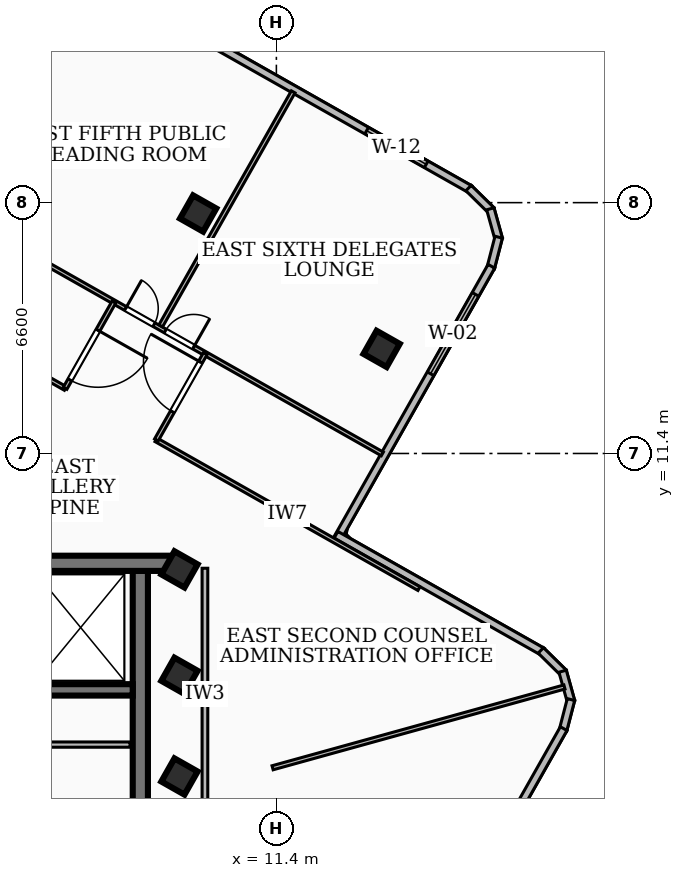
"""IFC4 building model, lengths in metres.
Left out: names, types, materials, properties, quantities, classifications, styles, units other than length and angle.
Written with IfcOpenShell. Run it as: python <this file> out.ifc"""

import sys

from ifc_helpers import new_model, si_unit, direction, frame, frame_2d, origin, origin_2d, place, context, subcontext, project, spatial, rectangle, extrude, element, fill, save


model = new_model("IFC4")
c1 = context("Model", 3, precision=1e-05, world=origin(), true_north=direction((0.0, 1.0)))
c2 = subcontext(c1, "Body", "Model", "MODEL_VIEW")
j1 = project(units=[si_unit("LENGTHUNIT", "METRE"), si_unit("PLANEANGLEUNIT", "RADIAN")], contexts=[c1])
p1 = place(None, origin())
s1 = spatial("IfcSite", under=j1, at=p1, CompositionType="ELEMENT")
p2 = place(p1, origin())
s2 = spatial("IfcBuilding", under=s1, at=p2, CompositionType="ELEMENT")
p3 = place(p2, frame((0.0, 0.0, 278.28)))
s3 = spatial("IfcBuildingStorey", under=s2, at=p3, CompositionType="ELEMENT", Elevation=278.28)
p4 = place(p3, frame((-8.78, 8.51, 0.0), z_axis=(0.0, 0.0, 1.0), x_axis=(1.0, 0.0, 0.0)))
e1 = element("IfcWall", 1, at=p4, inside=s3, PredefinedType="SHEAR", context=c2, shape_type="SweptSolid", body=[
    extrude(rectangle(XDim=17.56, YDim=0.4, at=frame_2d((8.78, 0.0))), origin(), (0.0, 0.0, 1.0), 3.16),
])
p5 = place(p3, frame((7.82, 8.31, 0.0), z_axis=(0.0, 0.0, 1.0), x_axis=(0.0, -1.0, 0.0)))
e2 = element("IfcWall", 2, at=p5, inside=s3, PredefinedType="SHEAR", context=c2, shape_type="SweptSolid", body=[
    extrude(rectangle(XDim=6.36, YDim=0.4, at=frame_2d((3.18, 0.0))), origin(), (0.0, 0.0, 1.0), 3.16),
])
p6 = place(p3, frame((7.62, 5.18, 0.0), z_axis=(0.0, 0.0, 1.0), x_axis=(-1.0, 0.0, 0.0)))
e3 = element("IfcWall", 3, at=p6, inside=s3, PredefinedType="SOLIDWALL", context=c2, shape_type="SweptSolid", body=[
    extrude(rectangle(XDim=15.24, YDim=0.3, at=frame_2d((7.62, 0.0))), origin(), (0.0, 0.0, 1.0), 3.16),
])
p7 = place(p6, frame((5.77, 0.0, 0.0)))
e4 = element("IfcOpeningElement", 4, at=p7, cuts=e3, PredefinedType="OPENING", context=c2, shape_type="SweptSolid", body=[
    extrude(rectangle(XDim=1.1, YDim=2.15, at=frame_2d((0.55, 1.075))), frame((0.0, 0.16, 0.0), z_axis=(0.0, -1.0, 0.0), x_axis=(1.0, 0.0, 0.0)), (0.0, 0.0, 1.0), 0.32),
])
p8 = place(p6, frame((2.97, 0.0, 0.0)))
e5 = element("IfcOpeningElement", 5, at=p8, cuts=e3, PredefinedType="OPENING", context=c2, shape_type="SweptSolid", body=[
    extrude(rectangle(XDim=1.1, YDim=2.15, at=frame_2d((0.55, 1.075))), frame((0.0, 0.16, 0.0), z_axis=(0.0, -1.0, 0.0), x_axis=(1.0, 0.0, 0.0)), (0.0, 0.0, 1.0), 0.32),
])
p9 = place(p6, frame((7.97, 0.0, 0.0)))
e6 = element("IfcOpeningElement", 6, at=p9, cuts=e3, PredefinedType="OPENING", context=c2, shape_type="SweptSolid", body=[
    extrude(rectangle(XDim=1.0, YDim=2.1, at=frame_2d((0.5, 1.05))), frame((0.0, 0.16, 0.0), z_axis=(0.0, -1.0, 0.0), x_axis=(1.0, 0.0, 0.0)), (0.0, 0.0, 1.0), 0.32),
])
for number, where, z_axis, x_axis in (
    (7, (8.85, 2.9, 0.0), (0.0, 0.0, 1.0), (0.493, 0.87, 0.0)),
    (8, (8.85, 5.55, 0.0), (0.0, 0.0, 1.0), (0.493, 0.87, 0.0)),
    (9, (8.85, 8.35, 0.0), (0.0, 0.0, 1.0), (0.493, 0.87, 0.0)),
    (10, (14.169, 14.152, 0.0), (0.0, 0.0, 1.0), (0.493, 0.87, 0.0)),
    (11, (9.341, 17.714, 0.0), (0.0, 0.0, 1.0), (0.493, 0.87, 0.0)),
):
    element("IfcColumn", number, at=place(p3, frame(where, z_axis=z_axis, x_axis=x_axis)), inside=s3, PredefinedType="COLUMN", context=c2, shape_type="SweptSolid", body=[
        extrude(rectangle(XDim=0.7, YDim=0.7, at=origin_2d()), origin(), (0.0, 0.0, 1.0), 3.42),
    ])
p10 = place(p3, frame((1.599, 15.609, 0.0), z_axis=(0.0, 0.0, 1.0), x_axis=(0.492609649108, 0.870250385582, 0.0)))
e12 = element("IfcWall", 12, at=p10, inside=s3, PredefinedType="SOLIDWALL", context=c2, shape_type="SweptSolid", body=[
    extrude(rectangle(XDim=8.241, YDim=0.2, at=frame_2d((4.121, 0.0))), origin(), (0.0, 0.0, 1.0), 3.16),
])
p11 = place(p10, frame((5.528, 0.0, 0.85)))
e13 = element("IfcOpeningElement", 13, at=p11, cuts=e12, PredefinedType="OPENING", context=c2, shape_type="SweptSolid", body=[
    extrude(rectangle(XDim=1.8, YDim=1.8, at=frame_2d((0.9, 0.9))), frame((0.0, 0.11, 0.0), z_axis=(0.0, -1.0, 0.0), x_axis=(1.0, 0.0, 0.0)), (0.0, 0.0, 1.0), 0.22),
])
p12 = place(p3, frame((7.687, 23.342, 0.0), z_axis=(0.0, 0.0, 1.0), x_axis=(0.870205552017, -0.49268884424, 0.0)))
e14 = element("IfcWall", 14, at=p12, inside=s3, PredefinedType="SOLIDWALL", context=c2, shape_type="SweptSolid", body=[
    extrude(rectangle(XDim=10.124, YDim=0.2, at=frame_2d((5.062, 0.0))), origin(), (0.0, 0.0, 1.0), 3.16),
])
p13 = place(p12, frame((6.997, 0.0, 0.85)))
e15 = element("IfcOpeningElement", 15, at=p13, cuts=e14, PredefinedType="OPENING", context=c2, shape_type="SweptSolid", body=[
    extrude(rectangle(XDim=1.8, YDim=1.6, at=frame_2d((0.9, 0.8))), frame((0.0, 0.11, 0.0), z_axis=(0.0, -1.0, 0.0), x_axis=(1.0, 0.0, 0.0)), (0.0, 0.0, 1.0), 0.22),
])
p14 = place(p3, frame((16.457, 18.384, 0.0), z_axis=(0.0, 0.0, 1.0), x_axis=(0.712904820367, -0.701260805334, 0.0)))
e16 = element("IfcWall", 16, at=p14, inside=s3, PredefinedType="SOLIDWALL", context=c2, shape_type="SweptSolid", body=[
    extrude(rectangle(XDim=0.839, YDim=0.2, at=frame_2d((0.419, 0.0))), origin(), (0.0, 0.0, 1.0), 3.16),
])
p15 = place(p3, frame((17.03, 17.838, 0.0), z_axis=(0.0, 0.0, 1.0), x_axis=(0.267796477586, -0.963475503888, 0.0)))
e17 = element("IfcWall", 17, at=p15, inside=s3, PredefinedType="SOLIDWALL", context=c2, shape_type="SweptSolid", body=[
    extrude(rectangle(XDim=0.825, YDim=0.2, at=frame_2d((0.413, 0.0))), origin(), (0.0, 0.0, 1.0), 3.16),
])
p16 = place(p3, frame((17.25, 17.091, 0.0), z_axis=(0.0, 0.0, 1.0), x_axis=(-0.250618286331, -0.968085985105, 0.0)))
e18 = element("IfcWall", 18, at=p16, inside=s3, PredefinedType="SOLIDWALL", context=c2, shape_type="SweptSolid", body=[
    extrude(rectangle(XDim=0.838, YDim=0.2, at=frame_2d((0.419, 0.0))), origin(), (0.0, 0.0, 1.0), 3.16),
])
p17 = place(p3, frame((17.058, 16.326, 0.0), z_axis=(0.0, 0.0, 1.0), x_axis=(-0.492504245901, -0.870310041175, 0.0)))
e19 = element("IfcWall", 19, at=p17, inside=s3, PredefinedType="SOLIDWALL", context=c2, shape_type="SweptSolid", body=[
    extrude(rectangle(XDim=8.242, YDim=0.2, at=frame_2d((4.121, 0.0))), origin(), (0.0, 0.0, 1.0), 3.16),
])
p18 = place(p17, frame((0.85, 0.0, 0.85)))
e20 = element("IfcOpeningElement", 20, at=p18, cuts=e19, PredefinedType="OPENING", context=c2, shape_type="SweptSolid", body=[
    extrude(rectangle(XDim=2.4, YDim=2.1, at=frame_2d((1.2, 1.05))), frame((0.0, 0.11, 0.0), z_axis=(0.0, -1.0, 0.0), x_axis=(1.0, 0.0, 0.0)), (0.0, 0.0, 1.0), 0.22),
])
p19 = place(p3, frame((12.968, 9.262, 0.0), z_axis=(0.0, 0.0, 1.0), x_axis=(0.87026539867, -0.492583125855, 0.0)))
e21 = element("IfcWall", 21, at=p19, inside=s3, PredefinedType="SOLIDWALL", context=c2, shape_type="SweptSolid", body=[
    extrude(rectangle(XDim=6.24, YDim=0.2, at=frame_2d((3.12, 0.0))), origin(), (0.0, 0.0, 1.0), 3.16),
])
p20 = place(p3, frame((18.359, 6.218, 0.0), z_axis=(0.0, 0.0, 1.0), x_axis=(0.712466161804, -0.701706468749, 0.0)))
e22 = element("IfcWall", 22, at=p20, inside=s3, PredefinedType="SOLIDWALL", context=c2, shape_type="SweptSolid", body=[
    extrude(rectangle(XDim=0.84, YDim=0.2, at=frame_2d((0.42, 0.0))), origin(), (0.0, 0.0, 1.0), 3.16),
])
p21 = place(p3, frame((18.932, 5.671, 0.0), z_axis=(0.0, 0.0, 1.0), x_axis=(0.268377126675, -0.963313924885, 0.0)))
e23 = element("IfcWall", 23, at=p21, inside=s3, PredefinedType="SOLIDWALL", context=c2, shape_type="SweptSolid", body=[
    extrude(rectangle(XDim=0.824, YDim=0.2, at=frame_2d((0.412, 0.0))), origin(), (0.0, 0.0, 1.0), 3.16),
])
p22 = place(p3, frame((19.152, 4.925, 0.0), z_axis=(0.0, 0.0, 1.0), x_axis=(-0.250891369276, -0.968015248239, 0.0)))
e24 = element("IfcWall", 24, at=p22, inside=s3, PredefinedType="SOLIDWALL", context=c2, shape_type="SweptSolid", body=[
    extrude(rectangle(XDim=0.838, YDim=0.2, at=frame_2d((0.419, 0.0))), origin(), (0.0, 0.0, 1.0), 3.16),
])
p23 = place(p3, frame((18.96, 4.16, 0.0), z_axis=(0.0, 0.0, 1.0), x_axis=(-0.492441425139, -0.870345588147, 0.0)))
e25 = element("IfcWall", 25, at=p23, inside=s3, PredefinedType="SOLIDWALL", context=c2, shape_type="SweptSolid", body=[
    extrude(rectangle(XDim=6.742, YDim=0.2, at=frame_2d((3.371, 0.0))), origin(), (0.0, 0.0, 1.0), 3.16),
])
p24 = place(p3, frame((2.9, 3.74, 0.0), z_axis=(0.0, 0.0, 1.0), x_axis=(1.0, 0.0, 0.0)))
e26 = element("IfcWall", 26, at=p24, inside=s3, PredefinedType="PARTITIONING", context=c2, shape_type="SweptSolid", body=[
    extrude(rectangle(XDim=4.65, YDim=0.138, at=frame_2d((2.325, 0.0))), origin(), (0.0, 0.0, 1.0), 3.16),
])
p25 = place(p3, frame((9.52, 1.75, 0.0), z_axis=(0.0, 0.0, 1.0), x_axis=(0.0, 1.0, 0.0)))
e27 = element("IfcWall", 27, at=p25, inside=s3, PredefinedType="PARTITIONING", context=c2, shape_type="SweptSolid", body=[
    extrude(rectangle(XDim=6.63, YDim=0.15, at=frame_2d((3.315, 0.0))), origin(), (0.0, 0.0, 1.0), 3.16),
])
p26 = place(p3, frame((11.3, 3.13, 0.0), z_axis=(0.0, 0.0, 1.0), x_axis=(0.963747113025, 0.26681735726, 0.0)))
e28 = element("IfcWall", 28, at=p26, inside=s3, PredefinedType="PARTITIONING", context=c2, shape_type="SweptSolid", body=[
    extrude(rectangle(XDim=7.969, YDim=0.11, at=frame_2d((3.984, 0.0))), origin(), (0.0, 0.0, 1.0), 3.16),
])
p27 = place(p3, frame((5.849, 13.11, 0.0), z_axis=(0.0, 0.0, 1.0), x_axis=(-0.870169207172, 0.49275303235, 0.0)))
e29 = element("IfcWall", 29, at=p27, inside=s3, PredefinedType="PARTITIONING", context=c2, shape_type="SweptSolid", body=[
    extrude(rectangle(XDim=8.45, YDim=0.11, at=frame_2d((4.225, 0.0))), origin(), (0.0, 0.0, 1.0), 3.16),
])
p28 = place(p3, frame((15.152, 7.843, 0.0), z_axis=(0.0, 0.0, 1.0), x_axis=(-0.87023152106, 0.492642973921, 0.0)))
e30 = element("IfcWall", 30, at=p28, inside=s3, PredefinedType="PARTITIONING", context=c2, shape_type="SweptSolid", body=[
    extrude(rectangle(XDim=7.951, YDim=0.11, at=frame_2d((3.976, 0.0))), origin(), (0.0, 0.0, 1.0), 2.53),
])
p29 = place(p3, frame((7.126, 15.386, 0.0), z_axis=(0.0, 0.0, 1.0), x_axis=(-0.492719860856, -0.870187990447, 0.0)))
e31 = element("IfcWall", 31, at=p29, inside=s3, PredefinedType="PARTITIONING", context=c2, shape_type="SweptSolid", body=[
    extrude(rectangle(XDim=2.61, YDim=0.11, at=frame_2d((1.305, 0.0))), origin(), (0.0, 0.0, 1.0), 3.16),
])
p30 = place(p29, frame((0.855, 0.0, 0.0)))
e32 = element("IfcOpeningElement", 32, at=p30, cuts=e31, PredefinedType="OPENING", context=c2, shape_type="SweptSolid", body=[
    extrude(rectangle(XDim=1.5, YDim=2.12, at=frame_2d((0.75, 1.06))), frame((0.0, 0.065, 0.0), z_axis=(0.0, -1.0, 0.0), x_axis=(1.0, 0.0, 0.0)), (0.0, 0.0, 1.0), 0.13),
])
p31 = place(p3, frame((8.242, 11.755, 0.0), z_axis=(0.0, 0.0, 1.0), x_axis=(0.492790693409, 0.870147879667, 0.0)))
e33 = element("IfcWall", 33, at=p31, inside=s3, PredefinedType="PARTITIONING", context=c2, shape_type="SweptSolid", body=[
    extrude(rectangle(XDim=2.61, YDim=0.11, at=frame_2d((1.305, 0.0))), origin(), (0.0, 0.0, 1.0), 2.53),
])
p32 = place(p31, frame((0.855, 0.0, 0.0)))
e34 = element("IfcOpeningElement", 34, at=p32, cuts=e33, PredefinedType="OPENING", context=c2, shape_type="SweptSolid", body=[
    extrude(rectangle(XDim=1.5, YDim=2.12, at=frame_2d((0.75, 1.06))), frame((0.0, 0.065, 0.0), z_axis=(0.0, -1.0, 0.0), x_axis=(1.0, 0.0, 0.0)), (0.0, 0.0, 1.0), 0.13),
])
p33 = place(p3, frame((8.357, 14.758, 0.0), z_axis=(0.0, 0.0, 1.0), x_axis=(0.492600685366, 0.870255459493, 0.0)))
e35 = element("IfcWall", 35, at=p33, inside=s3, PredefinedType="PARTITIONING", context=c2, shape_type="SweptSolid", body=[
    extrude(rectangle(XDim=7.075, YDim=0.11, at=frame_2d((3.538, 0.0))), origin(), (0.0, 0.0, 1.0), 2.53),
])
p34 = place(p3, frame((2.902, 17.778, 0.0), z_axis=(0.0, 0.0, 1.0), x_axis=(0.870194117035, -0.492709040588, 0.0)))
e36 = element("IfcWall", 36, at=p34, inside=s3, PredefinedType="PARTITIONING", context=c2, shape_type="SweptSolid", body=[
    extrude(rectangle(XDim=12.969, YDim=0.11, at=frame_2d((6.485, 0.0))), origin(), (0.0, 0.0, 1.0), 2.53),
])
p35 = place(p34, frame((6.405, 0.0, 0.0)))
e37 = element("IfcOpeningElement", 37, at=p35, cuts=e36, PredefinedType="OPENING", context=c2, shape_type="SweptSolid", body=[
    extrude(rectangle(XDim=0.86, YDim=2.04, at=frame_2d((0.43, 1.02))), frame((0.0, 0.065, 0.0), z_axis=(0.0, -1.0, 0.0), x_axis=(1.0, 0.0, 0.0)), (0.0, 0.0, 1.0), 0.13),
])
p36 = place(p34, frame((5.205, 0.0, 0.0)))
e38 = element("IfcOpeningElement", 38, at=p36, cuts=e36, PredefinedType="OPENING", context=c2, shape_type="SweptSolid", body=[
    extrude(rectangle(XDim=0.86, YDim=2.04, at=frame_2d((0.43, 1.02))), frame((0.0, 0.065, 0.0), z_axis=(0.0, -1.0, 0.0), x_axis=(1.0, 0.0, 0.0)), (0.0, 0.0, 1.0), 0.13),
])
p37 = place(p13, origin())
e39 = element("IfcWindow", 39, at=p37, inside=s3, PartitioningType="SINGLE_PANEL", PredefinedType="WINDOW", context=c2, shape_type="SweptSolid", body=[
    extrude(rectangle(XDim=1.8, YDim=1.6, at=frame_2d((0.9, 0.8))), frame((0.0, 0.03, 0.0), z_axis=(0.0, -1.0, 0.0), x_axis=(1.0, 0.0, 0.0)), (0.0, 0.0, 1.0), 0.06),
])
fill(e15, e39)
p38 = place(p18, origin())
e40 = element("IfcWindow", 40, at=p38, inside=s3, PartitioningType="SINGLE_PANEL", PredefinedType="WINDOW", context=c2, shape_type="SweptSolid", body=[
    extrude(rectangle(XDim=2.4, YDim=2.1, at=frame_2d((1.2, 1.05))), frame((0.0, 0.03, 0.0), z_axis=(0.0, -1.0, 0.0), x_axis=(1.0, 0.0, 0.0)), (0.0, 0.0, 1.0), 0.06),
])
fill(e20, e40)
p39 = place(p30, origin())
e41 = element("IfcDoor", 41, at=p39, inside=s3, OperationType="SINGLE_SWING_LEFT", PredefinedType="DOOR", context=c2, shape_type="SweptSolid", body=[
    extrude(rectangle(XDim=1.5, YDim=2.12, at=frame_2d((0.75, 1.06))), frame((0.0, 0.025, 0.0), z_axis=(0.0, -1.0, 0.0), x_axis=(1.0, 0.0, 0.0)), (0.0, 0.0, 1.0), 0.05),
])
fill(e32, e41)
p40 = place(p32, origin())
e42 = element("IfcDoor", 42, at=p40, inside=s3, OperationType="SINGLE_SWING_RIGHT", PredefinedType="DOOR", context=c2, shape_type="SweptSolid", body=[
    extrude(rectangle(XDim=1.5, YDim=2.12, at=frame_2d((0.75, 1.06))), frame((0.0, 0.025, 0.0), z_axis=(0.0, -1.0, 0.0), x_axis=(1.0, 0.0, 0.0)), (0.0, 0.0, 1.0), 0.05),
])
fill(e34, e42)
p41 = place(p35, origin())
e43 = element("IfcDoor", 43, at=p41, inside=s3, OperationType="SINGLE_SWING_RIGHT", PredefinedType="DOOR", context=c2, shape_type="SweptSolid", body=[
    extrude(rectangle(XDim=0.86, YDim=2.04, at=frame_2d((0.43, 1.02))), frame((0.0, 0.025, 0.0), z_axis=(0.0, -1.0, 0.0), x_axis=(1.0, 0.0, 0.0)), (0.0, 0.0, 1.0), 0.05),
])
fill(e37, e43)
p42 = place(p36, origin())
e44 = element("IfcDoor", 44, at=p42, inside=s3, OperationType="SINGLE_SWING_LEFT", PredefinedType="DOOR", context=c2, shape_type="SweptSolid", body=[
    extrude(rectangle(XDim=0.86, YDim=2.04, at=frame_2d((0.43, 1.02))), frame((0.0, 0.025, 0.0), z_axis=(0.0, -1.0, 0.0), x_axis=(1.0, 0.0, 0.0)), (0.0, 0.0, 1.0), 0.05),
])
fill(e38, e44)
save(model, sys.argv[1])
